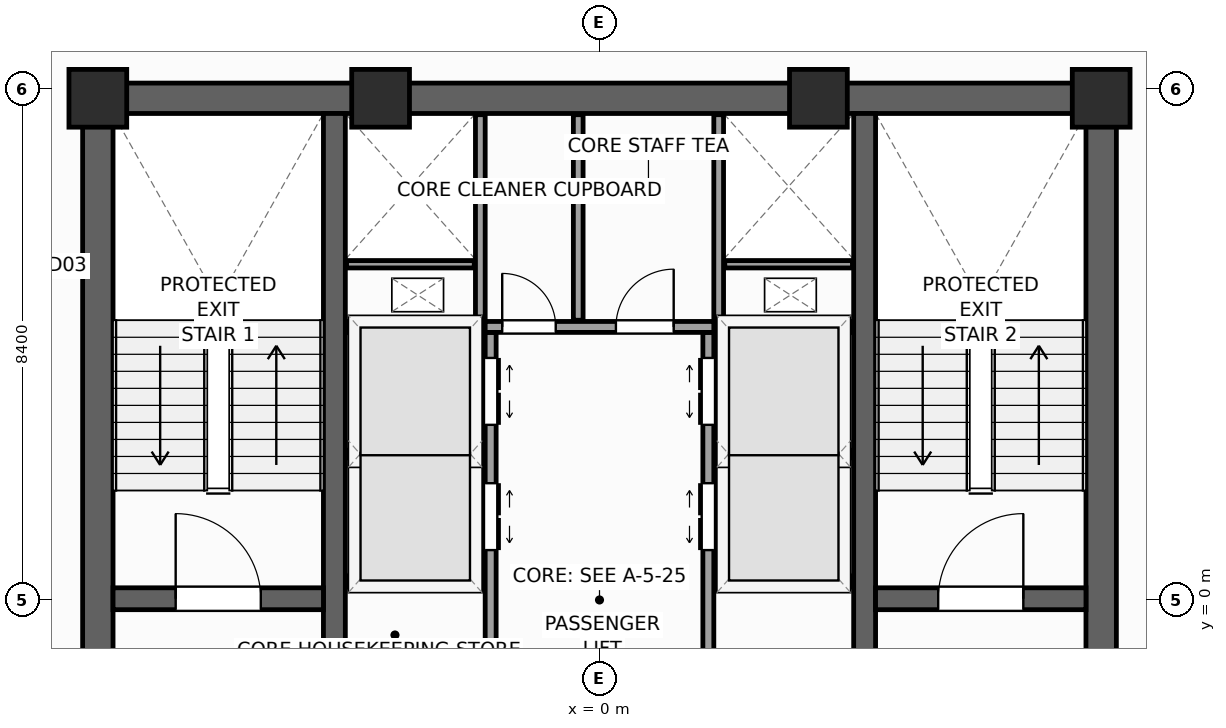
"""IFC4 building model, lengths in metres.
Left out: names, types, materials, properties, quantities, classifications, styles, units other than length and angle.
Written with IfcOpenShell. Run it as: python <this file> out.ifc"""

import sys

from ifc_helpers import new_model, si_unit, direction, frame, frame_2d, origin, origin_2d, place, context, subcontext, project, spatial, rectangle, extrude, source, transform, mapped, element, fill, save


model = new_model("IFC4")
c1 = context("Model", 3, precision=1e-05, world=origin(), true_north=direction((0.0, 1.0)))
c2 = subcontext(c1, "Body", "Model", "MODEL_VIEW")
j1 = project(units=[si_unit("LENGTHUNIT", "METRE"), si_unit("PLANEANGLEUNIT", "RADIAN")], contexts=[c1])
p1 = place(None, origin())
s1 = spatial("IfcSite", under=j1, at=p1, CompositionType="ELEMENT")
p2 = place(p1, origin())
s2 = spatial("IfcBuilding", under=s1, at=p2, CompositionType="ELEMENT")
p3 = place(p2, frame((0.0, 0.0, 244.6)))
s3 = spatial("IfcBuildingStorey", under=s2, at=p3, CompositionType="ELEMENT", Elevation=244.6)
p4 = place(p3, frame((-8.5, 8.25, 0.0), z_axis=(0.0, 0.0, 1.0), x_axis=(1.0, 0.0, 0.0)))
e1 = element("IfcWall", 1, at=p4, inside=s3, PredefinedType="SHEAR", context=c2, shape_type="SweptSolid", body=[
    extrude(rectangle(XDim=17.0, YDim=0.5, at=frame_2d((8.5, 0.0))), origin(), (0.0, 0.0, 1.0), 3.9),
])
p5 = place(p3, frame((-8.25, -8.0, 0.0), z_axis=(0.0, 0.0, 1.0), x_axis=(0.0, 1.0, 0.0)))
e2 = element("IfcWall", 2, at=p5, inside=s3, PredefinedType="SHEAR", context=c2, shape_type="SweptSolid", body=[
    extrude(rectangle(XDim=16.0, YDim=0.5, at=frame_2d((8.0, 0.0))), origin(), (0.0, 0.0, 1.0), 3.9),
])
p6 = place(p5, frame((4.69, 0.0, 0.0)))
e3 = element("IfcOpeningElement", 3, at=p6, cuts=e2, PredefinedType="OPENING", context=c2, shape_type="SweptSolid", body=[
    extrude(rectangle(XDim=1.3, YDim=2.2, at=frame_2d((0.65, 1.1))), frame((0.0, 0.26, 0.0), z_axis=(0.0, -1.0, 0.0), x_axis=(1.0, 0.0, 0.0)), (0.0, 0.0, 1.0), 0.52),
])
p7 = place(p3, frame((8.25, -8.0, 0.0), z_axis=(0.0, 0.0, 1.0), x_axis=(0.0, 1.0, 0.0)))
e4 = element("IfcWall", 4, at=p7, inside=s3, PredefinedType="SHEAR", context=c2, shape_type="SweptSolid", body=[
    extrude(rectangle(XDim=16.0, YDim=0.5, at=frame_2d((8.0, 0.0))), origin(), (0.0, 0.0, 1.0), 3.9),
])
p8 = place(p7, frame((4.69, 0.0, 0.0)))
e5 = element("IfcOpeningElement", 5, at=p8, cuts=e4, PredefinedType="OPENING", context=c2, shape_type="SweptSolid", body=[
    extrude(rectangle(XDim=1.3, YDim=2.2, at=frame_2d((0.65, 1.1))), frame((0.0, 0.26, 0.0), z_axis=(0.0, -1.0, 0.0), x_axis=(1.0, 0.0, 0.0)), (0.0, 0.0, 1.0), 0.52),
])
for number, where, z_axis, x_axis in (
    (6, (-4.36, -8.0, 0.0), (0.0, 0.0, 1.0), (0.0, 1.0, 0.0)),
    (7, (4.36, -8.0, 0.0), (0.0, 0.0, 1.0), (0.0, 1.0, 0.0)),
):
    element("IfcWall", number, at=place(p3, frame(where, z_axis=z_axis, x_axis=x_axis)), inside=s3, PredefinedType="SHEAR", context=c2, shape_type="SweptSolid", body=[
        extrude(rectangle(XDim=16.0, YDim=0.36, at=frame_2d((8.0, 0.0))), origin(), (0.0, 0.0, 1.0), 3.9),
    ])
p9 = place(p3, frame((-8.0, 0.02, 0.0), z_axis=(0.0, 0.0, 1.0), x_axis=(1.0, 0.0, 0.0)))
e8 = element("IfcWall", 8, at=p9, inside=s3, PredefinedType="SHEAR", context=c2, shape_type="SweptSolid", body=[
    extrude(rectangle(XDim=3.46, YDim=0.36, at=frame_2d((1.73, 0.0))), origin(), (0.0, 0.0, 1.0), 3.9),
])
p10 = place(p9, frame((1.03, 0.0, 0.0)))
e9 = element("IfcOpeningElement", 9, at=p10, cuts=e8, PredefinedType="OPENING", context=c2, shape_type="SweptSolid", body=[
    extrude(rectangle(XDim=1.4, YDim=2.2, at=frame_2d((0.7, 1.1))), frame((0.0, 0.19, 0.0), z_axis=(0.0, -1.0, 0.0), x_axis=(1.0, 0.0, 0.0)), (0.0, 0.0, 1.0), 0.38),
])
p11 = place(p3, frame((4.54, 0.02, 0.0), z_axis=(0.0, 0.0, 1.0), x_axis=(1.0, 0.0, 0.0)))
e10 = element("IfcWall", 10, at=p11, inside=s3, PredefinedType="SHEAR", context=c2, shape_type="SweptSolid", body=[
    extrude(rectangle(XDim=3.46, YDim=0.36, at=frame_2d((1.73, 0.0))), origin(), (0.0, 0.0, 1.0), 3.9),
])
p12 = place(p11, frame((1.03, 0.0, 0.0)))
e11 = element("IfcOpeningElement", 11, at=p12, cuts=e10, PredefinedType="OPENING", context=c2, shape_type="SweptSolid", body=[
    extrude(rectangle(XDim=1.4, YDim=2.2, at=frame_2d((0.7, 1.1))), frame((0.0, 0.19, 0.0), z_axis=(0.0, -1.0, 0.0), x_axis=(1.0, 0.0, 0.0)), (0.0, 0.0, 1.0), 0.38),
])
m1 = source(origin(), c2, "Body", "SweptSolid", [
    extrude(rectangle(XDim=0.95, YDim=0.95, at=origin_2d()), origin(), (0.0, 0.0, 1.0), 3.9),
])
for number, where, z_axis, x_axis in (
    (12, (8.25, 8.25, 0.0), (0.0, 0.0, 1.0), (1.0, 0.0, 0.0)),
    (13, (-8.25, 8.25, 0.0), (0.0, 0.0, 1.0), (1.0, 0.0, 0.0)),
    (14, (-3.6, 8.25, 0.0), (0.0, 0.0, 1.0), (1.0, 0.0, 0.0)),
    (15, (3.6, 8.25, 0.0), (0.0, 0.0, 1.0), (1.0, 0.0, 0.0)),
):
    element("IfcColumn", number, at=place(p3, frame(where, z_axis=z_axis, x_axis=x_axis)), inside=s3, PredefinedType="PILASTER", context=c2, shape_type="MappedRepresentation", body=[
        mapped(m1, transform((0.0, 0.0, 0.0), scale=1.0)),
    ])
p13 = place(p3, frame((6.733, -29.154, 0.0), z_axis=(0.0, 0.0, 1.0), x_axis=(0.629325378072, 0.77714192302, 0.0)))
e16 = element("IfcWall", 16, at=p13, inside=s3, PredefinedType="STANDARD", context=c2, shape_type="SweptSolid", body=[
    extrude(rectangle(XDim=36.84, YDim=0.34, at=frame_2d((18.42, 0.0))), origin(), (0.0, 0.0, 1.0), 2.96),
])
p14 = place(p13, frame((23.495, 0.0, 0.0)))
e17 = element("IfcOpeningElement", 17, at=p14, cuts=e16, PredefinedType="OPENING", context=c2, shape_type="SweptSolid", body=[
    extrude(rectangle(XDim=1.05, YDim=2.25, at=frame_2d((0.525, 1.125))), frame((0.0, 0.18, 0.0), z_axis=(0.0, -1.0, 0.0), x_axis=(1.0, 0.0, 0.0)), (0.0, 0.0, 1.0), 0.36),
])
p15 = place(p13, frame((3.721, 0.0, 0.48)))
e18 = element("IfcOpeningElement", 18, at=p15, cuts=e16, PredefinedType="OPENING", context=c2, shape_type="SweptSolid", body=[
    extrude(rectangle(XDim=1.4, YDim=2.4, at=frame_2d((0.7, 1.2))), frame((0.0, 0.18, 0.0), z_axis=(0.0, -1.0, 0.0), x_axis=(1.0, 0.0, 0.0)), (0.0, 0.0, 1.0), 0.36),
])
p16 = place(p13, frame((9.809, 0.0, 0.58)))
e19 = element("IfcOpeningElement", 19, at=p16, cuts=e16, PredefinedType="OPENING", context=c2, shape_type="SweptSolid", body=[
    extrude(rectangle(XDim=1.75, YDim=2.3, at=frame_2d((0.875, 1.15))), frame((0.0, 0.18, 0.0), z_axis=(0.0, -1.0, 0.0), x_axis=(1.0, 0.0, 0.0)), (0.0, 0.0, 1.0), 0.36),
])
p17 = place(p13, frame((16.058, 0.0, 0.58)))
e20 = element("IfcOpeningElement", 20, at=p17, cuts=e16, PredefinedType="OPENING", context=c2, shape_type="SweptSolid", body=[
    extrude(rectangle(XDim=1.75, YDim=2.3, at=frame_2d((0.875, 1.15))), frame((0.0, 0.18, 0.0), z_axis=(0.0, -1.0, 0.0), x_axis=(1.0, 0.0, 0.0)), (0.0, 0.0, 1.0), 0.36),
])
p18 = place(p13, frame((25.676, 0.0, 0.58)))
e21 = element("IfcOpeningElement", 21, at=p18, cuts=e16, PredefinedType="OPENING", context=c2, shape_type="SweptSolid", body=[
    extrude(rectangle(XDim=1.75, YDim=2.3, at=frame_2d((0.875, 1.15))), frame((0.0, 0.18, 0.0), z_axis=(0.0, -1.0, 0.0), x_axis=(1.0, 0.0, 0.0)), (0.0, 0.0, 1.0), 0.36),
])
p19 = place(p13, frame((30.982, 0.0, 0.48)))
e22 = element("IfcOpeningElement", 22, at=p19, cuts=e16, PredefinedType="OPENING", context=c2, shape_type="SweptSolid", body=[
    extrude(rectangle(XDim=1.4, YDim=2.4, at=frame_2d((0.7, 1.2))), frame((0.0, 0.18, 0.0), z_axis=(0.0, -1.0, 0.0), x_axis=(1.0, 0.0, 0.0)), (0.0, 0.0, 1.0), 0.36),
])
p20 = place(p3, frame((29.154, 6.733, 0.0), z_axis=(0.0, 0.0, 1.0), x_axis=(-0.77714192302, 0.629325378072, 0.0)))
e23 = element("IfcWall", 23, at=p20, inside=s3, PredefinedType="STANDARD", context=c2, shape_type="SweptSolid", body=[
    extrude(rectangle(XDim=36.84, YDim=0.34, at=frame_2d((18.42, 0.0))), origin(), (0.0, 0.0, 1.0), 2.96),
])
p21 = place(p20, frame((3.721, 0.0, 0.48)))
e24 = element("IfcOpeningElement", 24, at=p21, cuts=e23, PredefinedType="OPENING", context=c2, shape_type="SweptSolid", body=[
    extrude(rectangle(XDim=1.4, YDim=2.4, at=frame_2d((0.7, 1.2))), frame((0.0, 0.18, 0.0), z_axis=(0.0, -1.0, 0.0), x_axis=(1.0, 0.0, 0.0)), (0.0, 0.0, 1.0), 0.36),
])
p22 = place(p20, frame((9.809, 0.0, 0.58)))
e25 = element("IfcOpeningElement", 25, at=p22, cuts=e23, PredefinedType="OPENING", context=c2, shape_type="SweptSolid", body=[
    extrude(rectangle(XDim=1.75, YDim=2.3, at=frame_2d((0.875, 1.15))), frame((0.0, 0.18, 0.0), z_axis=(0.0, -1.0, 0.0), x_axis=(1.0, 0.0, 0.0)), (0.0, 0.0, 1.0), 0.36),
])
p23 = place(p20, frame((16.058, 0.0, 0.58)))
e26 = element("IfcOpeningElement", 26, at=p23, cuts=e23, PredefinedType="OPENING", context=c2, shape_type="SweptSolid", body=[
    extrude(rectangle(XDim=1.75, YDim=2.3, at=frame_2d((0.875, 1.15))), frame((0.0, 0.18, 0.0), z_axis=(0.0, -1.0, 0.0), x_axis=(1.0, 0.0, 0.0)), (0.0, 0.0, 1.0), 0.36),
])
p24 = place(p20, frame((24.176, 0.0, 0.58)))
e27 = element("IfcOpeningElement", 27, at=p24, cuts=e23, PredefinedType="OPENING", context=c2, shape_type="SweptSolid", body=[
    extrude(rectangle(XDim=1.75, YDim=2.3, at=frame_2d((0.875, 1.15))), frame((0.0, 0.18, 0.0), z_axis=(0.0, -1.0, 0.0), x_axis=(1.0, 0.0, 0.0)), (0.0, 0.0, 1.0), 0.36),
])
p25 = place(p20, frame((30.982, 0.0, 0.48)))
e28 = element("IfcOpeningElement", 28, at=p25, cuts=e23, PredefinedType="OPENING", context=c2, shape_type="SweptSolid", body=[
    extrude(rectangle(XDim=1.4, YDim=2.4, at=frame_2d((0.7, 1.2))), frame((0.0, 0.18, 0.0), z_axis=(0.0, -1.0, 0.0), x_axis=(1.0, 0.0, 0.0)), (0.0, 0.0, 1.0), 0.36),
])
p26 = place(p3, frame((-6.733, 29.154, 0.0), z_axis=(0.0, 0.0, 1.0), x_axis=(-0.629325378072, -0.77714192302, 0.0)))
e29 = element("IfcWall", 29, at=p26, inside=s3, PredefinedType="STANDARD", context=c2, shape_type="SweptSolid", body=[
    extrude(rectangle(XDim=36.84, YDim=0.34, at=frame_2d((18.42, 0.0))), origin(), (0.0, 0.0, 1.0), 2.96),
])
p27 = place(p26, frame((23.495, 0.0, 0.0)))
e30 = element("IfcOpeningElement", 30, at=p27, cuts=e29, PredefinedType="OPENING", context=c2, shape_type="SweptSolid", body=[
    extrude(rectangle(XDim=1.05, YDim=2.25, at=frame_2d((0.525, 1.125))), frame((0.0, 0.18, 0.0), z_axis=(0.0, -1.0, 0.0), x_axis=(1.0, 0.0, 0.0)), (0.0, 0.0, 1.0), 0.36),
])
p28 = place(p26, frame((3.721, 0.0, 0.48)))
e31 = element("IfcOpeningElement", 31, at=p28, cuts=e29, PredefinedType="OPENING", context=c2, shape_type="SweptSolid", body=[
    extrude(rectangle(XDim=1.4, YDim=2.4, at=frame_2d((0.7, 1.2))), frame((0.0, 0.18, 0.0), z_axis=(0.0, -1.0, 0.0), x_axis=(1.0, 0.0, 0.0)), (0.0, 0.0, 1.0), 0.36),
])
p29 = place(p26, frame((9.809, 0.0, 0.58)))
e32 = element("IfcOpeningElement", 32, at=p29, cuts=e29, PredefinedType="OPENING", context=c2, shape_type="SweptSolid", body=[
    extrude(rectangle(XDim=1.75, YDim=2.3, at=frame_2d((0.875, 1.15))), frame((0.0, 0.18, 0.0), z_axis=(0.0, -1.0, 0.0), x_axis=(1.0, 0.0, 0.0)), (0.0, 0.0, 1.0), 0.36),
])
p30 = place(p26, frame((16.058, 0.0, 0.58)))
e33 = element("IfcOpeningElement", 33, at=p30, cuts=e29, PredefinedType="OPENING", context=c2, shape_type="SweptSolid", body=[
    extrude(rectangle(XDim=1.75, YDim=2.3, at=frame_2d((0.875, 1.15))), frame((0.0, 0.18, 0.0), z_axis=(0.0, -1.0, 0.0), x_axis=(1.0, 0.0, 0.0)), (0.0, 0.0, 1.0), 0.36),
])
p31 = place(p26, frame((25.676, 0.0, 0.58)))
e34 = element("IfcOpeningElement", 34, at=p31, cuts=e29, PredefinedType="OPENING", context=c2, shape_type="SweptSolid", body=[
    extrude(rectangle(XDim=1.75, YDim=2.3, at=frame_2d((0.875, 1.15))), frame((0.0, 0.18, 0.0), z_axis=(0.0, -1.0, 0.0), x_axis=(1.0, 0.0, 0.0)), (0.0, 0.0, 1.0), 0.36),
])
p32 = place(p26, frame((30.982, 0.0, 0.48)))
e35 = element("IfcOpeningElement", 35, at=p32, cuts=e29, PredefinedType="OPENING", context=c2, shape_type="SweptSolid", body=[
    extrude(rectangle(XDim=1.4, YDim=2.4, at=frame_2d((0.7, 1.2))), frame((0.0, 0.18, 0.0), z_axis=(0.0, -1.0, 0.0), x_axis=(1.0, 0.0, 0.0)), (0.0, 0.0, 1.0), 0.36),
])
p33 = place(p3, frame((-1.79, -7.98, 0.0), z_axis=(0.0, 0.0, 1.0), x_axis=(0.0, 1.0, 0.0)))
e36 = element("IfcWall", 36, at=p33, inside=s3, PredefinedType="PARTITIONING", context=c2, shape_type="SweptSolid", body=[
    extrude(rectangle(XDim=12.38, YDim=0.18, at=frame_2d((6.19, 0.0))), origin(), (0.0, 0.0, 1.0), 3.66),
])
p34 = place(p33, frame((8.8, 0.0, 0.0)))
e37 = element("IfcOpeningElement", 37, at=p34, cuts=e36, PredefinedType="OPENING", context=c2, shape_type="SweptSolid", body=[
    extrude(rectangle(XDim=1.1, YDim=2.2, at=frame_2d((0.55, 1.1))), frame((0.0, 0.1, 0.0), z_axis=(0.0, -1.0, 0.0), x_axis=(1.0, 0.0, 0.0)), (0.0, 0.0, 1.0), 0.2),
])
p35 = place(p33, frame((10.86, 0.0, 0.0)))
e38 = element("IfcOpeningElement", 38, at=p35, cuts=e36, PredefinedType="OPENING", context=c2, shape_type="SweptSolid", body=[
    extrude(rectangle(XDim=1.1, YDim=2.2, at=frame_2d((0.55, 1.1))), frame((0.0, 0.1, 0.0), z_axis=(0.0, -1.0, 0.0), x_axis=(1.0, 0.0, 0.0)), (0.0, 0.0, 1.0), 0.2),
])
p36 = place(p33, frame((1.4, 0.0, 0.0)))
e39 = element("IfcOpeningElement", 39, at=p36, cuts=e36, PredefinedType="OPENING", context=c2, shape_type="SweptSolid", body=[
    extrude(rectangle(XDim=1.15, YDim=2.25, at=frame_2d((0.575, 1.125))), frame((0.0, 0.1, 0.0), z_axis=(0.0, -1.0, 0.0), x_axis=(1.0, 0.0, 0.0)), (0.0, 0.0, 1.0), 0.2),
])
p37 = place(p33, frame((5.6, 0.0, 0.0)))
e40 = element("IfcOpeningElement", 40, at=p37, cuts=e36, PredefinedType="OPENING", context=c2, shape_type="SweptSolid", body=[
    extrude(rectangle(XDim=1.15, YDim=2.25, at=frame_2d((0.575, 1.125))), frame((0.0, 0.1, 0.0), z_axis=(0.0, -1.0, 0.0), x_axis=(1.0, 0.0, 0.0)), (0.0, 0.0, 1.0), 0.2),
])
p38 = place(p3, frame((1.79, -7.98, 0.0), z_axis=(0.0, 0.0, 1.0), x_axis=(0.0, 1.0, 0.0)))
e41 = element("IfcWall", 41, at=p38, inside=s3, PredefinedType="PARTITIONING", context=c2, shape_type="SweptSolid", body=[
    extrude(rectangle(XDim=12.38, YDim=0.18, at=frame_2d((6.19, 0.0))), origin(), (0.0, 0.0, 1.0), 3.66),
])
p39 = place(p38, frame((8.8, 0.0, 0.0)))
e42 = element("IfcOpeningElement", 42, at=p39, cuts=e41, PredefinedType="OPENING", context=c2, shape_type="SweptSolid", body=[
    extrude(rectangle(XDim=1.1, YDim=2.2, at=frame_2d((0.55, 1.1))), frame((0.0, 0.1, 0.0), z_axis=(0.0, -1.0, 0.0), x_axis=(1.0, 0.0, 0.0)), (0.0, 0.0, 1.0), 0.2),
])
p40 = place(p38, frame((10.86, 0.0, 0.0)))
e43 = element("IfcOpeningElement", 43, at=p40, cuts=e41, PredefinedType="OPENING", context=c2, shape_type="SweptSolid", body=[
    extrude(rectangle(XDim=1.1, YDim=2.2, at=frame_2d((0.55, 1.1))), frame((0.0, 0.1, 0.0), z_axis=(0.0, -1.0, 0.0), x_axis=(1.0, 0.0, 0.0)), (0.0, 0.0, 1.0), 0.2),
])
p41 = place(p38, frame((3.5, 0.0, 0.0)))
e44 = element("IfcOpeningElement", 44, at=p41, cuts=e41, PredefinedType="OPENING", context=c2, shape_type="SweptSolid", body=[
    extrude(rectangle(XDim=1.15, YDim=2.25, at=frame_2d((0.575, 1.125))), frame((0.0, 0.1, 0.0), z_axis=(0.0, -1.0, 0.0), x_axis=(1.0, 0.0, 0.0)), (0.0, 0.0, 1.0), 0.2),
])
p42 = place(p3, frame((-1.88, 4.49, 0.0), z_axis=(0.0, 0.0, 1.0), x_axis=(1.0, 0.0, 0.0)))
e45 = element("IfcWall", 45, at=p42, inside=s3, PredefinedType="PARTITIONING", context=c2, shape_type="SweptSolid", body=[
    extrude(rectangle(XDim=3.76, YDim=0.18, at=frame_2d((1.88, 0.0))), origin(), (0.0, 0.0, 1.0), 3.66),
])
p43 = place(p42, frame((0.28, 0.0, 0.0)))
e46 = element("IfcOpeningElement", 46, at=p43, cuts=e45, PredefinedType="OPENING", context=c2, shape_type="SweptSolid", body=[
    extrude(rectangle(XDim=0.88, YDim=2.1, at=frame_2d((0.44, 1.05))), frame((0.0, 0.1, 0.0), z_axis=(0.0, -1.0, 0.0), x_axis=(1.0, 0.0, 0.0)), (0.0, 0.0, 1.0), 0.2),
])
p44 = place(p42, frame((2.15, 0.0, 0.0)))
e47 = element("IfcOpeningElement", 47, at=p44, cuts=e45, PredefinedType="OPENING", context=c2, shape_type="SweptSolid", body=[
    extrude(rectangle(XDim=0.95, YDim=2.1, at=frame_2d((0.475, 1.05))), frame((0.0, 0.1, 0.0), z_axis=(0.0, -1.0, 0.0), x_axis=(1.0, 0.0, 0.0)), (0.0, 0.0, 1.0), 0.2),
])
for number, where, z_axis, x_axis in (
    (48, (-4.17, 0.3, 0.0), (0.0, 0.0, 1.0), (1.0, 0.0, 0.0)),
    (49, (1.89, 0.3, 0.0), (0.0, 0.0, 1.0), (1.0, 0.0, 0.0)),
    (50, (-4.17, 4.49, 0.0), (0.0, 0.0, 1.0), (1.0, 0.0, 0.0)),
    (51, (1.89, 4.49, 0.0), (0.0, 0.0, 1.0), (1.0, 0.0, 0.0)),
):
    element("IfcWall", number, at=place(p3, frame(where, z_axis=z_axis, x_axis=x_axis)), inside=s3, PredefinedType="PARTITIONING", context=c2, shape_type="SweptSolid", body=[
        extrude(rectangle(XDim=2.28, YDim=0.18, at=frame_2d((1.14, 0.0))), origin(), (0.0, 0.0, 1.0), 3.66),
    ])
for number, where, z_axis, x_axis in (
    (52, (-4.16, 2.4, 0.0), (0.0, 0.0, 1.0), (1.0, 0.0, 0.0)),
    (53, (1.9, 2.4, 0.0), (0.0, 0.0, 1.0), (1.0, 0.0, 0.0)),
):
    element("IfcWall", number, at=place(p3, frame(where, z_axis=z_axis, x_axis=x_axis)), inside=s3, PredefinedType="PARTITIONING", context=c2, shape_type="SweptSolid", body=[
        extrude(rectangle(XDim=2.26, YDim=0.12, at=frame_2d((1.13, 0.0))), origin(), (0.0, 0.0, 1.0), 3.66),
    ])
for number, where, z_axis, x_axis in (
    (54, (-1.96, 4.58, 0.0), (0.0, 0.0, 1.0), (0.0, 1.0, 0.0)),
    (55, (1.96, 4.58, 0.0), (0.0, 0.0, 1.0), (0.0, 1.0, 0.0)),
):
    element("IfcWall", number, at=place(p3, frame(where, z_axis=z_axis, x_axis=x_axis)), inside=s3, PredefinedType="PARTITIONING", context=c2, shape_type="SweptSolid", body=[
        extrude(rectangle(XDim=3.4, YDim=0.16, at=frame_2d((1.7, 0.0))), origin(), (0.0, 0.0, 1.0), 3.66),
    ])
for number, where, z_axis, x_axis in (
    (56, (-4.16, 5.52, 0.0), (0.0, 0.0, 1.0), (1.0, 0.0, 0.0)),
    (57, (2.06, 5.52, 0.0), (0.0, 0.0, 1.0), (1.0, 0.0, 0.0)),
):
    element("IfcWall", number, at=place(p3, frame(where, z_axis=z_axis, x_axis=x_axis)), inside=s3, PredefinedType="PARTITIONING", context=c2, shape_type="SweptSolid", body=[
        extrude(rectangle(XDim=2.1, YDim=0.12, at=frame_2d((1.05, 0.0))), origin(), (0.0, 0.0, 1.0), 3.66),
    ])
p45 = place(p3, frame((-0.35, 4.6, 0.0), z_axis=(0.0, 0.0, 1.0), x_axis=(0.0, 1.0, 0.0)))
e58 = element("IfcWall", 58, at=p45, inside=s3, PredefinedType="PARTITIONING", context=c2, shape_type="SweptSolid", body=[
    extrude(rectangle(XDim=3.38, YDim=0.16, at=frame_2d((1.69, 0.0))), origin(), (0.0, 0.0, 1.0), 3.66),
])
m2 = source(origin(), c2, "Body", "SweptSolid", [
    extrude(rectangle(XDim=1.4, YDim=2.2, at=frame_2d((0.7, 1.1))), frame((0.0, 0.025, 0.0), z_axis=(0.0, -1.0, 0.0), x_axis=(1.0, 0.0, 0.0)), (0.0, 0.0, 1.0), 0.05),
])
p46 = place(p10, origin())
e59 = element("IfcDoor", 59, at=p46, inside=s3, OperationType="SINGLE_SWING_LEFT", PredefinedType="DOOR", context=c2, shape_type="MappedRepresentation", body=[
    mapped(m2, transform((0.0, 0.0, 0.0), scale=1.0)),
])
fill(e9, e59)
p47 = place(p12, origin())
e60 = element("IfcDoor", 60, at=p47, inside=s3, OperationType="SINGLE_SWING_RIGHT", PredefinedType="DOOR", context=c2, shape_type="MappedRepresentation", body=[
    mapped(m2, transform((0.0, 0.0, 0.0), scale=1.0)),
])
fill(e11, e60)
m3 = source(origin(), c2, "Body", "SweptSolid", [
    extrude(rectangle(XDim=1.1, YDim=2.2, at=frame_2d((0.55, 1.1))), frame((0.0, 0.025, 0.0), z_axis=(0.0, -1.0, 0.0), x_axis=(1.0, 0.0, 0.0)), (0.0, 0.0, 1.0), 0.05),
])
p48 = place(p34, frame((1.1, 0.0, 0.0), z_axis=(0.0, 0.0, 1.0), x_axis=(-1.0, 0.0, 0.0)))
e61 = element("IfcDoor", 61, at=p48, inside=s3, OperationType="DOUBLE_DOOR_SLIDING", PredefinedType="DOOR", context=c2, shape_type="MappedRepresentation", body=[
    mapped(m3, transform((0.0, 0.0, 0.0), scale=1.0)),
])
fill(e37, e61)
p49 = place(p35, frame((1.1, 0.0, 0.0), z_axis=(0.0, 0.0, 1.0), x_axis=(-1.0, 0.0, 0.0)))
e62 = element("IfcDoor", 62, at=p49, inside=s3, OperationType="DOUBLE_DOOR_SLIDING", PredefinedType="DOOR", context=c2, shape_type="MappedRepresentation", body=[
    mapped(m3, transform((0.0, 0.0, 0.0), scale=1.0)),
])
fill(e38, e62)
p50 = place(p39, origin())
e63 = element("IfcDoor", 63, at=p50, inside=s3, OperationType="DOUBLE_DOOR_SLIDING", PredefinedType="DOOR", context=c2, shape_type="MappedRepresentation", body=[
    mapped(m3, transform((0.0, 0.0, 0.0), scale=1.0)),
])
fill(e42, e63)
p51 = place(p40, origin())
e64 = element("IfcDoor", 64, at=p51, inside=s3, OperationType="DOUBLE_DOOR_SLIDING", PredefinedType="DOOR", context=c2, shape_type="MappedRepresentation", body=[
    mapped(m3, transform((0.0, 0.0, 0.0), scale=1.0)),
])
fill(e43, e64)
m4 = source(origin(), c2, "Body", "SweptSolid", [
    extrude(rectangle(XDim=0.88, YDim=2.1, at=frame_2d((0.44, 1.05))), frame((0.0, 0.025, 0.0), z_axis=(0.0, -1.0, 0.0), x_axis=(1.0, 0.0, 0.0)), (0.0, 0.0, 1.0), 0.05),
])
p52 = place(p43, origin())
e65 = element("IfcDoor", 65, at=p52, inside=s3, OperationType="SINGLE_SWING_LEFT", PredefinedType="DOOR", context=c2, shape_type="MappedRepresentation", body=[
    mapped(m4, transform((0.0, 0.0, 0.0), scale=1.0)),
])
fill(e46, e65)
m5 = source(origin(), c2, "Body", "SweptSolid", [
    extrude(rectangle(XDim=0.95, YDim=2.1, at=frame_2d((0.475, 1.05))), frame((0.0, 0.025, 0.0), z_axis=(0.0, -1.0, 0.0), x_axis=(1.0, 0.0, 0.0)), (0.0, 0.0, 1.0), 0.05),
])
p53 = place(p44, origin())
e66 = element("IfcDoor", 66, at=p53, inside=s3, OperationType="SINGLE_SWING_RIGHT", PredefinedType="DOOR", context=c2, shape_type="MappedRepresentation", body=[
    mapped(m5, transform((0.0, 0.0, 0.0), scale=1.0)),
])
fill(e47, e66)
save(model, sys.argv[1])
